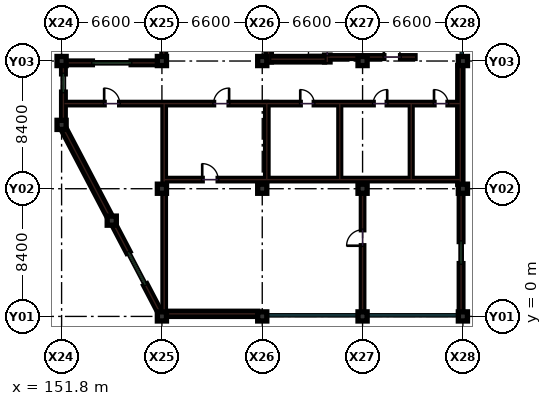
"""IFC4 building model, lengths in metres.
Left out: names, types, materials, properties, quantities, classifications, styles, units other than length and angle.
Written with IfcOpenShell. Run it as: python <this file> out.ifc"""

import sys

from ifc_helpers import new_model, si_unit, direction, frame, frame_2d, origin, origin_2d, place, context, subcontext, project, spatial, rectangle, extrude, element, fill, save


model = new_model("IFC4")
c1 = context("Model", 3, precision=1e-05, world=origin(), true_north=direction((0.0, 1.0)))
c2 = subcontext(c1, "Body", "Model", "MODEL_VIEW")
j1 = project(units=[si_unit("LENGTHUNIT", "METRE"), si_unit("PLANEANGLEUNIT", "RADIAN")], contexts=[c1])
p1 = place(None, origin())
s1 = spatial("IfcSite", under=j1, at=p1, CompositionType="ELEMENT")
p2 = place(p1, origin())
s2 = spatial("IfcBuilding", under=s1, at=p2, CompositionType="ELEMENT")
p3 = place(p2, frame((0.0, 0.0, 39.3)))
s3 = spatial("IfcBuildingStorey", under=s2, at=p3, CompositionType="ELEMENT", Elevation=39.3)
for number, where, z_axis, x_axis in (
    (1, (151.8, 16.8, 0.0), (0.0, 0.0, 1.0), (1.0, 0.0, 0.0)),
    (2, (158.4, 0.0, 0.0), (0.0, 0.0, 1.0), (1.0, 0.0, 0.0)),
    (3, (158.4, 8.4, 0.0), (0.0, 0.0, 1.0), (1.0, 0.0, 0.0)),
    (4, (158.4, 16.8, 0.0), (0.0, 0.0, 1.0), (1.0, 0.0, 0.0)),
    (5, (165.0, 0.0, 0.0), (0.0, 0.0, 1.0), (1.0, 0.0, 0.0)),
    (6, (165.0, 8.4, 0.0), (0.0, 0.0, 1.0), (1.0, 0.0, 0.0)),
    (7, (165.0, 16.8, 0.0), (0.0, 0.0, 1.0), (1.0, 0.0, 0.0)),
    (8, (171.6, 0.0, 0.0), (0.0, 0.0, 1.0), (1.0, 0.0, 0.0)),
    (9, (171.6, 8.4, 0.0), (0.0, 0.0, 1.0), (1.0, 0.0, 0.0)),
    (10, (171.6, 16.8, 0.0), (0.0, 0.0, 1.0), (1.0, 0.0, 0.0)),
    (11, (178.2, 0.0, 0.0), (0.0, 0.0, 1.0), (1.0, 0.0, 0.0)),
    (12, (178.2, 8.4, 0.0), (0.0, 0.0, 1.0), (1.0, 0.0, 0.0)),
    (13, (178.2, 16.8, 0.0), (0.0, 0.0, 1.0), (1.0, 0.0, 0.0)),
):
    element("IfcColumn", number, at=place(p3, frame(where, z_axis=z_axis, x_axis=x_axis)), inside=s3, PredefinedType="COLUMN", context=c2, shape_type="SweptSolid", body=[
        extrude(rectangle(XDim=0.6, YDim=0.6, at=origin_2d()), origin(), (0.0, 0.0, 1.0), 3.9),
    ])
for number, where, z_axis, x_axis in (
    (14, (151.8, 12.6, 0.0), (0.0, 0.0, 1.0), (1.0, 0.0, 0.0)),
    (15, (155.1, 6.3, 0.0), (0.0, 0.0, 1.0), (1.0, 0.0, 0.0)),
):
    element("IfcColumn", number, at=place(p3, frame(where, z_axis=z_axis, x_axis=x_axis)), inside=s3, PredefinedType="COLUMN", context=c2, shape_type="SweptSolid", body=[
        extrude(rectangle(XDim=0.6, YDim=0.6, at=origin_2d()), origin(), (0.0, 0.0, 1.0), 3.72),
    ])
p4 = place(p3, frame((165.3, 14.0, 0.0), z_axis=(0.0, 0.0, 1.0), x_axis=(1.0, 0.0, 0.0)))
e16 = element("IfcWall", 16, at=p4, inside=s3, PredefinedType="PARTITIONING", context=c2, shape_type="SweptSolid", body=[
    extrude(rectangle(XDim=12.7, YDim=0.16, at=frame_2d((6.35, 0.0))), origin(), (0.0, 0.0, 1.0), 2.93),
])
p5 = place(p4, frame((2.2, 0.0, 0.0)))
e17 = element("IfcOpeningElement", 17, at=p5, cuts=e16, PredefinedType="OPENING", context=c2, shape_type="SweptSolid", body=[
    extrude(rectangle(XDim=0.92, YDim=2.08, at=frame_2d((0.46, 1.04))), frame((0.0, 0.09, 0.0), z_axis=(0.0, -1.0, 0.0), x_axis=(1.0, 0.0, 0.0)), (0.0, 0.0, 1.0), 0.18),
])
p6 = place(p4, frame((7.0, 0.0, 0.0)))
e18 = element("IfcOpeningElement", 18, at=p6, cuts=e16, PredefinedType="OPENING", context=c2, shape_type="SweptSolid", body=[
    extrude(rectangle(XDim=0.92, YDim=2.08, at=frame_2d((0.46, 1.04))), frame((0.0, 0.09, 0.0), z_axis=(0.0, -1.0, 0.0), x_axis=(1.0, 0.0, 0.0)), (0.0, 0.0, 1.0), 0.18),
])
p7 = place(p4, frame((11.0, 0.0, 0.0)))
e19 = element("IfcOpeningElement", 19, at=p7, cuts=e16, PredefinedType="OPENING", context=c2, shape_type="SweptSolid", body=[
    extrude(rectangle(XDim=0.92, YDim=2.08, at=frame_2d((0.46, 1.04))), frame((0.0, 0.09, 0.0), z_axis=(0.0, -1.0, 0.0), x_axis=(1.0, 0.0, 0.0)), (0.0, 0.0, 1.0), 0.18),
])
p8 = place(p3, frame((165.3, 9.0, 0.0), z_axis=(0.0, 0.0, 1.0), x_axis=(1.0, 0.0, 0.0)))
e20 = element("IfcWall", 20, at=p8, inside=s3, PredefinedType="PARTITIONING", context=c2, shape_type="SweptSolid", body=[
    extrude(rectangle(XDim=12.7, YDim=0.16, at=frame_2d((6.35, 0.0))), origin(), (0.0, 0.0, 1.0), 2.93),
])
p9 = place(p3, frame((165.3, 9.0, 0.0), z_axis=(0.0, 0.0, 1.0), x_axis=(0.0, 1.0, 0.0)))
e21 = element("IfcWall", 21, at=p9, inside=s3, PredefinedType="PARTITIONING", context=c2, shape_type="SweptSolid", body=[
    extrude(rectangle(XDim=5.0, YDim=0.16, at=frame_2d((2.5, 0.0))), origin(), (0.0, 0.0, 1.0), 2.93),
])
for number, where, z_axis, x_axis in (
    (22, (170.1, 9.0, 0.0), (0.0, 0.0, 1.0), (0.0, 1.0, 0.0)),
    (23, (174.8, 9.0, 0.0), (0.0, 0.0, 1.0), (0.0, 1.0, 0.0)),
):
    element("IfcWall", number, at=place(p3, frame(where, z_axis=z_axis, x_axis=x_axis)), inside=s3, PredefinedType="PARTITIONING", context=c2, shape_type="SweptSolid", body=[
        extrude(rectangle(XDim=5.0, YDim=0.12, at=frame_2d((2.5, 0.0))), origin(), (0.0, 0.0, 1.0), 2.93),
    ])
p10 = place(p3, frame((158.55, 9.0, 0.0), z_axis=(0.0, 0.0, 1.0), x_axis=(1.0, 0.0, 0.0)))
e24 = element("IfcWall", 24, at=p10, inside=s3, PredefinedType="PARTITIONING", context=c2, shape_type="SweptSolid", body=[
    extrude(rectangle(XDim=6.75, YDim=0.16, at=frame_2d((3.375, 0.0))), origin(), (0.0, 0.0, 1.0), 2.93),
])
p11 = place(p10, frame((2.5, 0.0, 0.0)))
e25 = element("IfcOpeningElement", 25, at=p11, cuts=e24, PredefinedType="OPENING", context=c2, shape_type="SweptSolid", body=[
    extrude(rectangle(XDim=1.05, YDim=2.15, at=frame_2d((0.525, 1.075))), frame((0.0, 0.09, 0.0), z_axis=(0.0, -1.0, 0.0), x_axis=(1.0, 0.0, 0.0)), (0.0, 0.0, 1.0), 0.18),
])
p12 = place(p3, frame((171.6, 0.25, 0.0), z_axis=(0.0, 0.0, 1.0), x_axis=(0.0, 1.0, 0.0)))
e26 = element("IfcWall", 26, at=p12, inside=s3, PredefinedType="PARTITIONING", context=c2, shape_type="SweptSolid", body=[
    extrude(rectangle(XDim=7.7, YDim=0.16, at=frame_2d((3.85, 0.0))), origin(), (0.0, 0.0, 1.0), 2.93),
])
p13 = place(p12, frame((4.4, 0.0, 0.0)))
e27 = element("IfcOpeningElement", 27, at=p13, cuts=e26, PredefinedType="OPENING", context=c2, shape_type="SweptSolid", body=[
    extrude(rectangle(XDim=1.05, YDim=2.15, at=frame_2d((0.525, 1.075))), frame((0.0, 0.09, 0.0), z_axis=(0.0, -1.0, 0.0), x_axis=(1.0, 0.0, 0.0)), (0.0, 0.0, 1.0), 0.18),
])
p14 = place(p3, frame((158.55, 0.25, 0.0), z_axis=(0.0, 0.0, 1.0), x_axis=(0.0, 1.0, 0.0)))
e28 = element("IfcWall", 28, at=p14, inside=s3, PredefinedType="PARTITIONING", context=c2, shape_type="SweptSolid", body=[
    extrude(rectangle(XDim=7.7, YDim=0.16, at=frame_2d((3.85, 0.0))), origin(), (0.0, 0.0, 1.0), 2.93),
])
p15 = place(p3, frame((158.55, 8.85, 0.0), z_axis=(0.0, 0.0, 1.0), x_axis=(0.0, 1.0, 0.0)))
e29 = element("IfcWall", 29, at=p15, inside=s3, PredefinedType="PARTITIONING", context=c2, shape_type="SweptSolid", body=[
    extrude(rectangle(XDim=5.15, YDim=0.16, at=frame_2d((2.575, 0.0))), origin(), (0.0, 0.0, 1.0), 2.93),
])
p16 = place(p3, frame((152.0, 14.0, 0.0), z_axis=(0.0, 0.0, 1.0), x_axis=(1.0, 0.0, 0.0)))
e30 = element("IfcWall", 30, at=p16, inside=s3, PredefinedType="PARTITIONING", context=c2, shape_type="SweptSolid", body=[
    extrude(rectangle(XDim=13.3, YDim=0.16, at=frame_2d((6.65, 0.0))), origin(), (0.0, 0.0, 1.0), 2.93),
])
p17 = place(p16, frame((2.6, 0.0, 0.0)))
e31 = element("IfcOpeningElement", 31, at=p17, cuts=e30, PredefinedType="OPENING", context=c2, shape_type="SweptSolid", body=[
    extrude(rectangle(XDim=1.02, YDim=2.18, at=frame_2d((0.51, 1.09))), frame((0.0, 0.09, 0.0), z_axis=(0.0, -1.0, 0.0), x_axis=(1.0, 0.0, 0.0)), (0.0, 0.0, 1.0), 0.18),
])
p18 = place(p16, frame((9.8, 0.0, 0.0)))
e32 = element("IfcOpeningElement", 32, at=p18, cuts=e30, PredefinedType="OPENING", context=c2, shape_type="SweptSolid", body=[
    extrude(rectangle(XDim=1.02, YDim=2.18, at=frame_2d((0.51, 1.09))), frame((0.0, 0.09, 0.0), z_axis=(0.0, -1.0, 0.0), x_axis=(1.0, 0.0, 0.0)), (0.0, 0.0, 1.0), 0.18),
])
p19 = place(p3, frame((158.105, 16.68, 0.0), z_axis=(0.0, 0.0, 1.0), x_axis=(-1.0, 0.0, 0.0)))
e33 = element("IfcWall", 33, at=p19, inside=s3, PredefinedType="SOLIDWALL", context=c2, shape_type="SweptSolid", body=[
    extrude(rectangle(XDim=6.01, YDim=0.24, at=frame_2d((3.005, 0.0))), origin(), (0.0, 0.0, 1.0), 3.015),
])
p20 = place(p19, frame((1.73, 0.0, 0.95)))
e34 = element("IfcOpeningElement", 34, at=p20, cuts=e33, PredefinedType="OPENING", context=c2, shape_type="SweptSolid", body=[
    extrude(rectangle(XDim=2.55, YDim=1.65, at=frame_2d((1.275, 0.825))), frame((0.0, 0.13, 0.0), z_axis=(0.0, -1.0, 0.0), x_axis=(1.0, 0.0, 0.0)), (0.0, 0.0, 1.0), 0.26),
])
p21 = place(p3, frame((158.695, 0.17, 0.0), z_axis=(0.0, 0.0, 1.0), x_axis=(1.0, 0.0, 0.0)))
e35 = element("IfcWall", 35, at=p21, inside=s3, PredefinedType="SHEAR", context=c2, shape_type="SweptSolid", body=[
    extrude(rectangle(XDim=6.01, YDim=0.34, at=frame_2d((3.005, 0.0))), origin(), (0.0, 0.0, 1.0), 3.68),
])
p22 = place(p3, frame((158.52, 24.905, 0.0), z_axis=(0.0, 0.0, 1.0), x_axis=(0.0, -1.0, 0.0)))
e36 = element("IfcWall", 36, at=p22, inside=s3, PredefinedType="SOLIDWALL", context=c2, shape_type="SweptSolid", body=[
    extrude(rectangle(XDim=7.81, YDim=0.24, at=frame_2d((3.905, 0.0))), origin(), (0.0, 0.0, 1.0), 2.965),
])
p23 = place(p3, frame((178.08, 0.295, 0.0), z_axis=(0.0, 0.0, 1.0), x_axis=(0.0, 1.0, 0.0)))
e37 = element("IfcWall", 37, at=p23, inside=s3, PredefinedType="SOLIDWALL", context=c2, shape_type="SweptSolid", body=[
    extrude(rectangle(XDim=7.81, YDim=0.24, at=frame_2d((3.905, 0.0))), origin(), (0.0, 0.0, 1.0), 2.965),
])
p24 = place(p23, frame((3.18, 0.0, 0.95)))
e38 = element("IfcOpeningElement", 38, at=p24, cuts=e37, PredefinedType="OPENING", context=c2, shape_type="SweptSolid", body=[
    extrude(rectangle(XDim=1.45, YDim=1.6, at=frame_2d((0.725, 0.8))), frame((0.0, 0.13, 0.0), z_axis=(0.0, -1.0, 0.0), x_axis=(1.0, 0.0, 0.0)), (0.0, 0.0, 1.0), 0.26),
])
p25 = place(p3, frame((178.03, 8.695, 0.0), z_axis=(0.0, 0.0, 1.0), x_axis=(0.0, 1.0, 0.0)))
e39 = element("IfcWall", 39, at=p25, inside=s3, PredefinedType="SHEAR", context=c2, shape_type="SweptSolid", body=[
    extrude(rectangle(XDim=7.81, YDim=0.34, at=frame_2d((3.905, 0.0))), origin(), (0.0, 0.0, 1.0), 3.68),
])
p26 = place(p3, frame((151.92, 16.505, 0.0), z_axis=(0.0, 0.0, 1.0), x_axis=(0.0, -1.0, 0.0)))
e40 = element("IfcWall", 40, at=p26, inside=s3, PredefinedType="SOLIDWALL", context=c2, shape_type="SweptSolid", body=[
    extrude(rectangle(XDim=3.61, YDim=0.24, at=frame_2d((1.805, 0.0))), origin(), (0.0, 0.0, 1.0), 3.105),
])
p27 = place(p26, frame((0.55, 0.0, 0.95)))
e41 = element("IfcOpeningElement", 41, at=p27, cuts=e40, PredefinedType="OPENING", context=c2, shape_type="SweptSolid", body=[
    extrude(rectangle(XDim=1.2, YDim=1.5, at=frame_2d((0.6, 0.75))), frame((0.0, 0.13, 0.0), z_axis=(0.0, -1.0, 0.0), x_axis=(1.0, 0.0, 0.0)), (0.0, 0.0, 1.0), 0.26),
])
p28 = place(p3, frame((151.95, 12.31, 0.0), z_axis=(0.0, 0.0, 1.0), x_axis=(0.464471613901, -0.885588007981, 0.0)))
e42 = element("IfcWall", 42, at=p28, inside=s3, PredefinedType="SHEAR", context=c2, shape_type="SweptSolid", body=[
    extrude(rectangle(XDim=6.459, YDim=0.34, at=frame_2d((3.229, 0.0))), origin(), (0.0, 0.0, 1.0), 3.72),
])
p29 = place(p3, frame((155.25, 6.01, 0.0), z_axis=(0.0, 0.0, 1.0), x_axis=(0.464471613901, -0.885588007981, 0.0)))
e43 = element("IfcWall", 43, at=p29, inside=s3, PredefinedType="SOLIDWALL", context=c2, shape_type="SweptSolid", body=[
    extrude(rectangle(XDim=6.459, YDim=0.24, at=frame_2d((3.229, 0.0))), origin(), (0.0, 0.0, 1.0), 3.105),
])
p30 = place(p29, frame((2.03, 0.0, 0.95)))
e44 = element("IfcOpeningElement", 44, at=p30, cuts=e43, PredefinedType="OPENING", context=c2, shape_type="SweptSolid", body=[
    extrude(rectangle(XDim=2.4, YDim=1.6, at=frame_2d((1.2, 0.8))), frame((0.0, 0.13, 0.0), z_axis=(0.0, -1.0, 0.0), x_axis=(1.0, 0.0, 0.0)), (0.0, 0.0, 1.0), 0.26),
])
p31 = place(p3, frame((165.42, 16.74, 0.0), z_axis=(0.0, 0.0, 1.0), x_axis=(0.0, 1.0, 0.0)))
e45 = element("IfcWall", 45, at=p31, inside=s3, PredefinedType="SHEAR", context=c2, shape_type="SweptSolid", body=[
    extrude(rectangle(XDim=8.37, YDim=0.36, at=frame_2d((4.185, 0.0))), origin(), (0.0, 0.0, 1.0), 3.68),
])
p32 = place(p3, frame((169.28, 16.74, 0.0), z_axis=(0.0, 0.0, 1.0), x_axis=(0.0, 1.0, 0.0)))
e46 = element("IfcWall", 46, at=p32, inside=s3, PredefinedType="SHEAR", context=c2, shape_type="SweptSolid", body=[
    extrude(rectangle(XDim=8.37, YDim=0.36, at=frame_2d((4.185, 0.0))), origin(), (0.0, 0.0, 1.0), 3.68),
])
p33 = place(p32, frame((0.45, 0.0, 0.0)))
e47 = element("IfcOpeningElement", 47, at=p33, cuts=e46, PredefinedType="OPENING", context=c2, shape_type="SweptSolid", body=[
    extrude(rectangle(XDim=1.25, YDim=2.15, at=frame_2d((0.625, 1.075))), frame((0.0, 0.19, 0.0), z_axis=(0.0, -1.0, 0.0), x_axis=(1.0, 0.0, 0.0)), (0.0, 0.0, 1.0), 0.38),
])
p34 = place(p3, frame((165.6, 16.92, 0.0), z_axis=(0.0, 0.0, 1.0), x_axis=(1.0, 0.0, 0.0)))
e48 = element("IfcWall", 48, at=p34, inside=s3, PredefinedType="SHEAR", context=c2, shape_type="SweptSolid", body=[
    extrude(rectangle(XDim=3.5, YDim=0.36, at=frame_2d((1.75, 0.0))), origin(), (0.0, 0.0, 1.0), 3.68),
])
p35 = place(p3, frame((169.35, 17.06, 0.0), z_axis=(0.0, 0.0, 1.0), x_axis=(1.0, 0.0, 0.0)))
e49 = element("IfcWall", 49, at=p35, inside=s3, PredefinedType="SOLIDWALL", context=c2, shape_type="SweptSolid", body=[
    extrude(rectangle(XDim=5.7, YDim=0.18, at=frame_2d((2.85, 0.0))), origin(), (0.0, 0.0, 1.0), 3.015),
])
p36 = place(p35, frame((3.65, 0.0, 0.0)))
e50 = element("IfcOpeningElement", 50, at=p36, cuts=e49, PredefinedType="OPENING", context=c2, shape_type="SweptSolid", body=[
    extrude(rectangle(XDim=1.1, YDim=2.15, at=frame_2d((0.55, 1.075))), frame((0.0, 0.1, 0.0), z_axis=(0.0, -1.0, 0.0), x_axis=(1.0, 0.0, 0.0)), (0.0, 0.0, 1.0), 0.2),
])
p37 = place(p5, origin())
e51 = element("IfcDoor", 51, at=p37, inside=s3, OperationType="SINGLE_SWING_LEFT", PredefinedType="DOOR", context=c2, shape_type="SweptSolid", body=[
    extrude(rectangle(XDim=0.92, YDim=2.08, at=frame_2d((0.46, 1.04))), frame((0.0, 0.025, 0.0), z_axis=(0.0, -1.0, 0.0), x_axis=(1.0, 0.0, 0.0)), (0.0, 0.0, 1.0), 0.05),
])
fill(e17, e51)
p38 = place(p6, origin())
e52 = element("IfcDoor", 52, at=p38, inside=s3, OperationType="SINGLE_SWING_RIGHT", PredefinedType="DOOR", context=c2, shape_type="SweptSolid", body=[
    extrude(rectangle(XDim=0.92, YDim=2.08, at=frame_2d((0.46, 1.04))), frame((0.0, 0.025, 0.0), z_axis=(0.0, -1.0, 0.0), x_axis=(1.0, 0.0, 0.0)), (0.0, 0.0, 1.0), 0.05),
])
fill(e18, e52)
p39 = place(p7, origin())
e53 = element("IfcDoor", 53, at=p39, inside=s3, OperationType="SINGLE_SWING_LEFT", PredefinedType="DOOR", context=c2, shape_type="SweptSolid", body=[
    extrude(rectangle(XDim=0.92, YDim=2.08, at=frame_2d((0.46, 1.04))), frame((0.0, 0.025, 0.0), z_axis=(0.0, -1.0, 0.0), x_axis=(1.0, 0.0, 0.0)), (0.0, 0.0, 1.0), 0.05),
])
fill(e19, e53)
p40 = place(p11, origin())
e54 = element("IfcDoor", 54, at=p40, inside=s3, OperationType="SINGLE_SWING_LEFT", PredefinedType="DOOR", context=c2, shape_type="SweptSolid", body=[
    extrude(rectangle(XDim=1.05, YDim=2.15, at=frame_2d((0.525, 1.075))), frame((0.0, 0.025, 0.0), z_axis=(0.0, -1.0, 0.0), x_axis=(1.0, 0.0, 0.0)), (0.0, 0.0, 1.0), 0.05),
])
fill(e25, e54)
p41 = place(p13, origin())
e55 = element("IfcDoor", 55, at=p41, inside=s3, OperationType="SINGLE_SWING_LEFT", PredefinedType="DOOR", context=c2, shape_type="SweptSolid", body=[
    extrude(rectangle(XDim=1.05, YDim=2.15, at=frame_2d((0.525, 1.075))), frame((0.0, 0.025, 0.0), z_axis=(0.0, -1.0, 0.0), x_axis=(1.0, 0.0, 0.0)), (0.0, 0.0, 1.0), 0.05),
])
fill(e27, e55)
p42 = place(p17, origin())
e56 = element("IfcDoor", 56, at=p42, inside=s3, OperationType="SINGLE_SWING_LEFT", PredefinedType="DOOR", context=c2, shape_type="SweptSolid", body=[
    extrude(rectangle(XDim=1.02, YDim=2.18, at=frame_2d((0.51, 1.09))), frame((0.0, 0.025, 0.0), z_axis=(0.0, -1.0, 0.0), x_axis=(1.0, 0.0, 0.0)), (0.0, 0.0, 1.0), 0.05),
])
fill(e31, e56)
p43 = place(p18, origin())
e57 = element("IfcDoor", 57, at=p43, inside=s3, OperationType="SINGLE_SWING_RIGHT", PredefinedType="DOOR", context=c2, shape_type="SweptSolid", body=[
    extrude(rectangle(XDim=1.02, YDim=2.18, at=frame_2d((0.51, 1.09))), frame((0.0, 0.025, 0.0), z_axis=(0.0, -1.0, 0.0), x_axis=(1.0, 0.0, 0.0)), (0.0, 0.0, 1.0), 0.05),
])
fill(e32, e57)
p44 = place(p20, origin())
e58 = element("IfcWindow", 58, at=p44, inside=s3, PartitioningType="SINGLE_PANEL", PredefinedType="WINDOW", context=c2, shape_type="SweptSolid", body=[
    extrude(rectangle(XDim=2.55, YDim=1.65, at=frame_2d((1.275, 0.825))), frame((0.0, 0.03, 0.0), z_axis=(0.0, -1.0, 0.0), x_axis=(1.0, 0.0, 0.0)), (0.0, 0.0, 1.0), 0.06),
])
fill(e34, e58)
p45 = place(p24, origin())
e59 = element("IfcWindow", 59, at=p45, inside=s3, PartitioningType="SINGLE_PANEL", PredefinedType="WINDOW", context=c2, shape_type="SweptSolid", body=[
    extrude(rectangle(XDim=1.45, YDim=1.6, at=frame_2d((0.725, 0.8))), frame((0.0, 0.03, 0.0), z_axis=(0.0, -1.0, 0.0), x_axis=(1.0, 0.0, 0.0)), (0.0, 0.0, 1.0), 0.06),
])
fill(e38, e59)
p46 = place(p27, origin())
e60 = element("IfcWindow", 60, at=p46, inside=s3, PartitioningType="SINGLE_PANEL", PredefinedType="WINDOW", context=c2, shape_type="SweptSolid", body=[
    extrude(rectangle(XDim=1.2, YDim=1.5, at=frame_2d((0.6, 0.75))), frame((0.0, 0.03, 0.0), z_axis=(0.0, -1.0, 0.0), x_axis=(1.0, 0.0, 0.0)), (0.0, 0.0, 1.0), 0.06),
])
fill(e41, e60)
p47 = place(p30, origin())
e61 = element("IfcWindow", 61, at=p47, inside=s3, PartitioningType="SINGLE_PANEL", PredefinedType="WINDOW", context=c2, shape_type="SweptSolid", body=[
    extrude(rectangle(XDim=2.4, YDim=1.6, at=frame_2d((1.2, 0.8))), frame((0.0, 0.03, 0.0), z_axis=(0.0, -1.0, 0.0), x_axis=(1.0, 0.0, 0.0)), (0.0, 0.0, 1.0), 0.06),
])
fill(e44, e61)
p48 = place(p33, origin())
e62 = element("IfcDoor", 62, at=p48, inside=s3, OperationType="SINGLE_SWING_LEFT", PredefinedType="DOOR", context=c2, shape_type="SweptSolid", body=[
    extrude(rectangle(XDim=1.25, YDim=2.15, at=frame_2d((0.625, 1.075))), frame((0.0, 0.025, 0.0), z_axis=(0.0, -1.0, 0.0), x_axis=(1.0, 0.0, 0.0)), (0.0, 0.0, 1.0), 0.05),
])
fill(e47, e62)
p49 = place(p36, origin())
e63 = element("IfcDoor", 63, at=p49, inside=s3, OperationType="SINGLE_SWING_LEFT", PredefinedType="DOOR", context=c2, shape_type="SweptSolid", body=[
    extrude(rectangle(XDim=1.1, YDim=2.15, at=frame_2d((0.55, 1.075))), frame((0.0, 0.025, 0.0), z_axis=(0.0, -1.0, 0.0), x_axis=(1.0, 0.0, 0.0)), (0.0, 0.0, 1.0), 0.05),
])
fill(e50, e63)
save(model, sys.argv[1])
